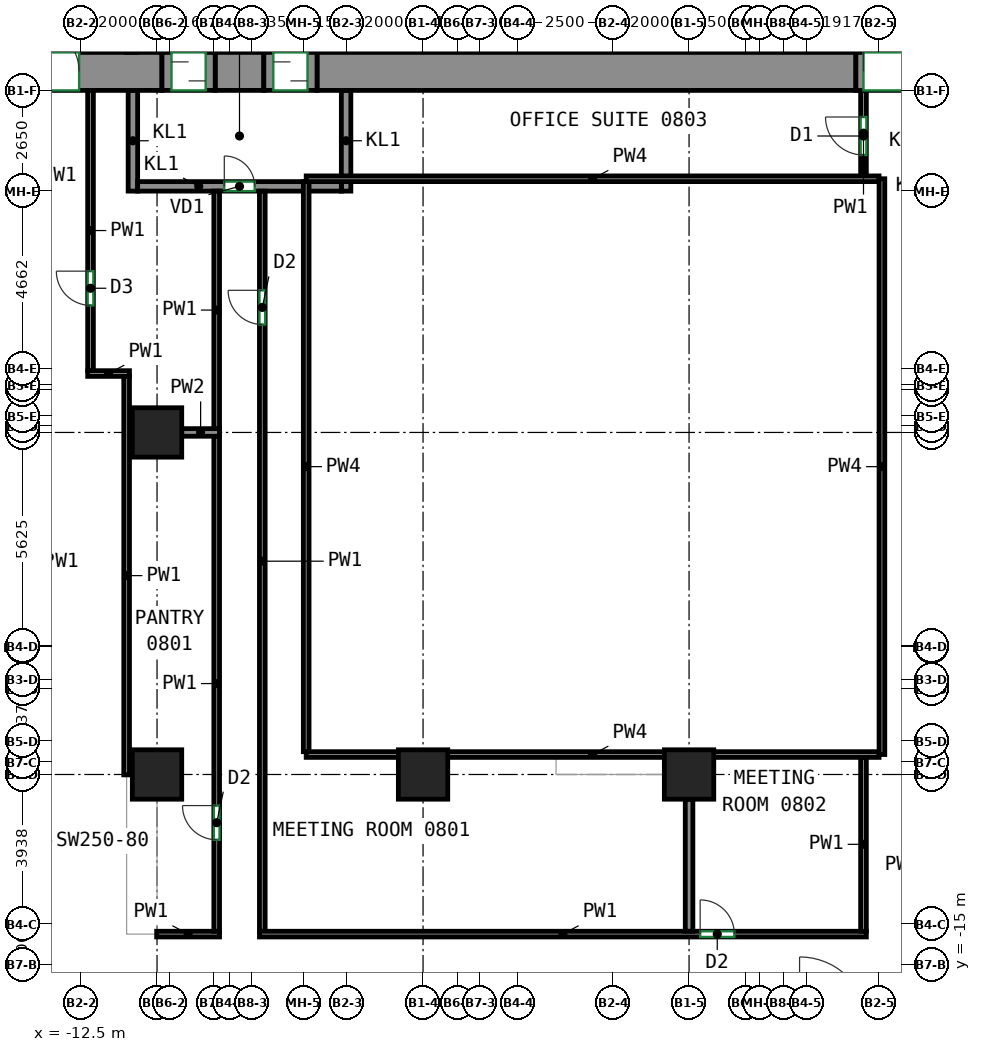
"""IFC4 building model, lengths in metres.
Left out: names, types, materials, properties, quantities, classifications, styles, units other than length and angle.
Written with IfcOpenShell. Run it as: python <this file> out.ifc"""

import sys

from ifc_helpers import new_model, si_unit, direction, frame, frame_2d, origin, origin_2d, place, context, subcontext, project, spatial, rectangle, extrude, source, transform, mapped, element, fill, save


model = new_model("IFC4")
c1 = context("Model", 3, precision=1e-05, world=origin(), true_north=direction((0.0, 1.0)))
c2 = subcontext(c1, "Body", "Model", "MODEL_VIEW")
j1 = project(units=[si_unit("LENGTHUNIT", "METRE"), si_unit("PLANEANGLEUNIT", "RADIAN")], contexts=[c1])
p1 = place(None, origin())
s1 = spatial("IfcSite", under=j1, at=p1, CompositionType="ELEMENT")
p2 = place(p1, origin())
s2 = spatial("IfcBuilding", under=s1, at=p2, CompositionType="ELEMENT")
p3 = place(p2, frame((0.0, 0.0, 39.0)))
s3 = spatial("IfcBuildingStorey", under=s2, at=p3, CompositionType="ELEMENT", Elevation=39.0)
m1 = source(origin(), c2, "Body", "SweptSolid", [
    extrude(rectangle(XDim=1.3, YDim=1.3, at=origin_2d()), origin(), (0.0, 0.0, 1.0), 3.72),
])
for number, where, z_axis, x_axis in (
    (1, (-10.5, -10.0, 0.0), (0.0, 0.0, 1.0), (1.0, 0.0, 0.0)),
    (2, (-10.5, -1.0, 0.0), (0.0, 0.0, 1.0), (1.0, 0.0, 0.0)),
    (3, (-3.5, -10.0, 0.0), (0.0, 0.0, 1.0), (1.0, 0.0, 0.0)),
    (4, (3.5, -10.0, 0.0), (0.0, 0.0, 1.0), (1.0, 0.0, 0.0)),
):
    element("IfcColumn", number, at=place(p3, frame(where, z_axis=z_axis, x_axis=x_axis)), inside=s3, PredefinedType="COLUMN", context=c2, shape_type="MappedRepresentation", body=[
        mapped(m1, transform((0.0, 0.0, 0.0))),
    ])
m2 = source(origin(), c2, "Body", "SweptSolid", [
    extrude(rectangle(XDim=5.63, YDim=1.0, at=frame_2d((2.815, 0.0))), origin(), (0.0, 0.0, 1.0), 3.72),
])
p4 = place(p3, frame((-16.0, 8.5, 0.0), z_axis=(0.0, 0.0, 1.0), x_axis=(1.0, 0.0, 0.0)))
e5 = element("IfcWall", 5, at=p4, inside=s3, PredefinedType="SHEAR", context=c2, shape_type="MappedRepresentation", body=[
    mapped(m2, transform((0.0, 0.0, 0.0))),
])
p5 = place(p4, frame((2.25, 0.0, 0.0)))
e6 = element("IfcOpeningElement", 6, at=p5, cuts=e5, PredefinedType="OPENING", context=c2, shape_type="SweptSolid", body=[
    extrude(rectangle(XDim=1.2, YDim=2.1, at=frame_2d((0.6, 1.05))), frame((0.0, 0.51, 0.0), z_axis=(0.0, -1.0, 0.0), x_axis=(1.0, 0.0, 0.0)), (0.0, 0.0, 1.0), 1.02),
])
m3 = source(origin(), c2, "Body", "SweptSolid", [
    extrude(rectangle(XDim=1.28, YDim=1.0, at=frame_2d((0.64, 0.0))), origin(), (0.0, 0.0, 1.0), 3.72),
])
p6 = place(p3, frame((-8.97, 8.5, 0.0), z_axis=(0.0, 0.0, 1.0), x_axis=(1.0, 0.0, 0.0)))
e7 = element("IfcWall", 7, at=p6, inside=s3, PredefinedType="SHEAR", context=c2, shape_type="MappedRepresentation", body=[
    mapped(m3, transform((0.0, 0.0, 0.0))),
])
m4 = source(origin(), c2, "Body", "SweptSolid", [
    extrude(rectangle(XDim=14.18, YDim=1.0, at=frame_2d((7.09, 0.0))), origin(), (0.0, 0.0, 1.0), 3.72),
])
p7 = place(p3, frame((-6.29, 8.5, 0.0), z_axis=(0.0, 0.0, 1.0), x_axis=(1.0, 0.0, 0.0)))
e8 = element("IfcWall", 8, at=p7, inside=s3, PredefinedType="SHEAR", context=c2, shape_type="MappedRepresentation", body=[
    mapped(m4, transform((0.0, 0.0, 0.0))),
])
m5 = source(origin(), c2, "Body", "SweptSolid", [
    extrude(rectangle(XDim=2.65, YDim=0.25, at=frame_2d((1.325, 0.0))), origin(), (0.0, 0.0, 1.0), 3.72),
])
for number, where, z_axis, x_axis in (
    (9, (-11.135, 5.35, 0.0), (0.0, 0.0, 1.0), (0.0, 1.0, 0.0)),
    (10, (-5.525, 5.35, 0.0), (0.0, 0.0, 1.0), (0.0, 1.0, 0.0)),
):
    element("IfcWall", number, at=place(p3, frame(where, z_axis=z_axis, x_axis=x_axis)), inside=s3, PredefinedType="PARTITIONING", context=c2, shape_type="MappedRepresentation", body=[
        mapped(m5, transform((0.0, 0.0, 0.0))),
    ])
m6 = source(origin(), c2, "Body", "SweptSolid", [
    extrude(rectangle(XDim=5.36, YDim=0.25, at=frame_2d((2.68, 0.0))), origin(), (0.0, 0.0, 1.0), 3.72),
])
p8 = place(p3, frame((-11.01, 5.475, 0.0), z_axis=(0.0, 0.0, 1.0), x_axis=(1.0, 0.0, 0.0)))
e11 = element("IfcWall", 11, at=p8, inside=s3, PredefinedType="PARTITIONING", context=c2, shape_type="MappedRepresentation", body=[
    mapped(m6, transform((0.0, 0.0, 0.0))),
])
p9 = place(p8, frame((2.28, 0.0, 0.0)))
e12 = element("IfcOpeningElement", 12, at=p9, cuts=e11, PredefinedType="OPENING", context=c2, shape_type="SweptSolid", body=[
    extrude(rectangle(XDim=0.8, YDim=2.0, at=frame_2d((0.4, 1.0))), frame((0.0, 0.135, 0.0), z_axis=(0.0, -1.0, 0.0), x_axis=(1.0, 0.0, 0.0)), (0.0, 0.0, 1.0), 0.27),
])
m7 = source(origin(), c2, "Body", "SweptSolid", [
    extrude(rectangle(XDim=1.4, YDim=1.0, at=frame_2d((0.7, 0.0))), origin(), (0.0, 0.0, 1.0), 2.7),
])
p10 = place(p3, frame((-10.37, 8.5, 0.0), z_axis=(0.0, 0.0, 1.0), x_axis=(1.0, 0.0, 0.0)))
e13 = element("IfcWall", 13, at=p10, inside=s3, PredefinedType="PARTITIONING", context=c2, shape_type="MappedRepresentation", body=[
    mapped(m7, transform((0.0, 0.0, 0.0))),
])
p11 = place(p10, frame((0.25, 0.0, 0.0)))
e14 = element("IfcOpeningElement", 14, at=p11, cuts=e13, PredefinedType="OPENING", context=c2, shape_type="SweptSolid", body=[
    extrude(rectangle(XDim=0.9, YDim=2.1, at=frame_2d((0.45, 1.05))), frame((0.0, 0.51, 0.0), z_axis=(0.0, -1.0, 0.0), x_axis=(1.0, 0.0, 0.0)), (0.0, 0.0, 1.0), 1.02),
])
m8 = source(origin(), c2, "Body", "SweptSolid", [
    extrude(rectangle(XDim=1.4, YDim=1.0, at=frame_2d((0.7, 0.0))), origin(), (0.0, 0.0, 1.0), 2.7),
])
p12 = place(p3, frame((-7.69, 8.5, 0.0), z_axis=(0.0, 0.0, 1.0), x_axis=(1.0, 0.0, 0.0)))
e15 = element("IfcWall", 15, at=p12, inside=s3, PredefinedType="PARTITIONING", context=c2, shape_type="MappedRepresentation", body=[
    mapped(m8, transform((0.0, 0.0, 0.0))),
])
p13 = place(p12, frame((0.25, 0.0, 0.0)))
e16 = element("IfcOpeningElement", 16, at=p13, cuts=e15, PredefinedType="OPENING", context=c2, shape_type="SweptSolid", body=[
    extrude(rectangle(XDim=0.9, YDim=2.1, at=frame_2d((0.45, 1.05))), frame((0.0, 0.51, 0.0), z_axis=(0.0, -1.0, 0.0), x_axis=(1.0, 0.0, 0.0)), (0.0, 0.0, 1.0), 1.02),
])
m9 = source(origin(), c2, "Body", "SweptSolid", [
    extrude(rectangle(XDim=2.4, YDim=1.0, at=frame_2d((1.2, 0.0))), origin(), (0.0, 0.0, 1.0), 2.7),
])
p14 = place(p3, frame((7.89, 8.5, 0.0), z_axis=(0.0, 0.0, 1.0), x_axis=(1.0, 0.0, 0.0)))
e17 = element("IfcWall", 17, at=p14, inside=s3, PredefinedType="PARTITIONING", context=c2, shape_type="MappedRepresentation", body=[
    mapped(m9, transform((0.0, 0.0, 0.0))),
])
p15 = place(p14, frame((0.2, 0.0, 0.0)))
e18 = element("IfcOpeningElement", 18, at=p15, cuts=e17, PredefinedType="OPENING", context=c2, shape_type="SweptSolid", body=[
    extrude(rectangle(XDim=2.0, YDim=2.1, at=frame_2d((1.0, 1.05))), frame((0.0, 0.51, 0.0), z_axis=(0.0, -1.0, 0.0), x_axis=(1.0, 0.0, 0.0)), (0.0, 0.0, 1.0), 1.02),
])
p16 = place(p3, frame((-12.25, 0.625, 0.0), z_axis=(0.0, 0.0, 1.0), x_axis=(0.0, 1.0, 0.0)))
e19 = element("IfcWall", 19, at=p16, inside=s3, PredefinedType="PARTITIONING", context=c2, shape_type="SweptSolid", body=[
    extrude(rectangle(XDim=7.375, YDim=0.15, at=frame_2d((3.688, 0.0))), origin(), (0.0, 0.0, 1.0), 3.72),
])
p17 = place(p16, frame((1.719, 0.0, 0.0)))
e20 = element("IfcOpeningElement", 20, at=p17, cuts=e19, PredefinedType="OPENING", context=c2, shape_type="SweptSolid", body=[
    extrude(rectangle(XDim=0.9, YDim=2.1, at=frame_2d((0.45, 1.05))), frame((0.0, 0.085, 0.0), z_axis=(0.0, -1.0, 0.0), x_axis=(1.0, 0.0, 0.0)), (0.0, 0.0, 1.0), 0.17),
])
p18 = place(p3, frame((-12.325, 0.55, 0.0), z_axis=(0.0, 0.0, 1.0), x_axis=(1.0, 0.0, 0.0)))
e21 = element("IfcWall", 21, at=p18, inside=s3, PredefinedType="PARTITIONING", context=c2, shape_type="SweptSolid", body=[
    extrude(rectangle(XDim=1.1, YDim=0.15, at=frame_2d((0.55, 0.0))), origin(), (0.0, 0.0, 1.0), 3.72),
])
p19 = place(p3, frame((-8.93, -0.91, 0.0), z_axis=(0.0, 0.0, 1.0), x_axis=(0.0, 1.0, 0.0)))
e22 = element("IfcWall", 22, at=p19, inside=s3, PredefinedType="PARTITIONING", context=c2, shape_type="SweptSolid", body=[
    extrude(rectangle(XDim=6.26, YDim=0.15, at=frame_2d((3.13, 0.0))), origin(), (0.0, 0.0, 1.0), 3.72),
])
p20 = place(p3, frame((-7.73, -14.125, 0.0), z_axis=(0.0, 0.0, 1.0), x_axis=(0.0, 1.0, 0.0)))
e23 = element("IfcWall", 23, at=p20, inside=s3, PredefinedType="PARTITIONING", context=c2, shape_type="SweptSolid", body=[
    extrude(rectangle(XDim=19.475, YDim=0.15, at=frame_2d((9.738, 0.0))), origin(), (0.0, 0.0, 1.0), 3.72),
])
p21 = place(p20, frame((15.965, 0.0, 0.0)))
e24 = element("IfcOpeningElement", 24, at=p21, cuts=e23, PredefinedType="OPENING", context=c2, shape_type="SweptSolid", body=[
    extrude(rectangle(XDim=0.9, YDim=2.1, at=frame_2d((0.45, 1.05))), frame((0.0, 0.085, 0.0), z_axis=(0.0, -1.0, 0.0), x_axis=(1.0, 0.0, 0.0)), (0.0, 0.0, 1.0), 0.17),
])
p22 = place(p3, frame((-7.805, -14.2, 0.0), z_axis=(0.0, 0.0, 1.0), x_axis=(1.0, 0.0, 0.0)))
e25 = element("IfcWall", 25, at=p22, inside=s3, PredefinedType="PARTITIONING", context=c2, shape_type="SweptSolid", body=[
    extrude(rectangle(XDim=15.97, YDim=0.15, at=frame_2d((7.985, 0.0))), origin(), (0.0, 0.0, 1.0), 3.72),
])
p23 = place(p22, frame((11.597, 0.0, 0.0)))
e26 = element("IfcOpeningElement", 26, at=p23, cuts=e25, PredefinedType="OPENING", context=c2, shape_type="SweptSolid", body=[
    extrude(rectangle(XDim=0.9, YDim=2.1, at=frame_2d((0.45, 1.05))), frame((0.0, 0.085, 0.0), z_axis=(0.0, -1.0, 0.0), x_axis=(1.0, 0.0, 0.0)), (0.0, 0.0, 1.0), 0.17),
])
p24 = place(p3, frame((-11.3, -10.01, 0.0), z_axis=(0.0, 0.0, 1.0), x_axis=(0.0, 1.0, 0.0)))
e27 = element("IfcWall", 27, at=p24, inside=s3, PredefinedType="PARTITIONING", context=c2, shape_type="SweptSolid", body=[
    extrude(rectangle(XDim=10.485, YDim=0.15, at=frame_2d((5.243, 0.0))), origin(), (0.0, 0.0, 1.0), 3.72),
])
p25 = place(p3, frame((-10.51, -14.2, 0.0), z_axis=(0.0, 0.0, 1.0), x_axis=(1.0, 0.0, 0.0)))
e28 = element("IfcWall", 28, at=p25, inside=s3, PredefinedType="PARTITIONING", context=c2, shape_type="SweptSolid", body=[
    extrude(rectangle(XDim=1.655, YDim=0.15, at=frame_2d((0.828, 0.0))), origin(), (0.0, 0.0, 1.0), 3.72),
])
p26 = place(p3, frame((-8.93, -14.125, 0.0), z_axis=(0.0, 0.0, 1.0), x_axis=(0.0, 1.0, 0.0)))
e29 = element("IfcWall", 29, at=p26, inside=s3, PredefinedType="PARTITIONING", context=c2, shape_type="SweptSolid", body=[
    extrude(rectangle(XDim=13.035, YDim=0.15, at=frame_2d((6.518, 0.0))), origin(), (0.0, 0.0, 1.0), 3.72),
])
p27 = place(p26, frame((2.407, 0.0, 0.0)))
e30 = element("IfcOpeningElement", 30, at=p27, cuts=e29, PredefinedType="OPENING", context=c2, shape_type="SweptSolid", body=[
    extrude(rectangle(XDim=0.9, YDim=2.1, at=frame_2d((0.45, 1.05))), frame((0.0, 0.085, 0.0), z_axis=(0.0, -1.0, 0.0), x_axis=(1.0, 0.0, 0.0)), (0.0, 0.0, 1.0), 0.17),
])
p28 = place(p3, frame((8.09, -14.125, 0.0), z_axis=(0.0, 0.0, 1.0), x_axis=(0.0, 1.0, 0.0)))
e31 = element("IfcWall", 31, at=p28, inside=s3, PredefinedType="PARTITIONING", context=c2, shape_type="SweptSolid", body=[
    extrude(rectangle(XDim=4.575, YDim=0.15, at=frame_2d((2.288, 0.0))), origin(), (0.0, 0.0, 1.0), 3.72),
])
p29 = place(p3, frame((8.09, 5.75, 0.0), z_axis=(0.0, 0.0, 1.0), x_axis=(0.0, 1.0, 0.0)))
e32 = element("IfcWall", 32, at=p29, inside=s3, PredefinedType="PARTITIONING", context=c2, shape_type="SweptSolid", body=[
    extrude(rectangle(XDim=2.25, YDim=0.15, at=frame_2d((1.125, 0.0))), origin(), (0.0, 0.0, 1.0), 3.72),
])
p30 = place(p29, frame((0.55, 0.0, 0.0)))
e33 = element("IfcOpeningElement", 33, at=p30, cuts=e32, PredefinedType="OPENING", context=c2, shape_type="SweptSolid", body=[
    extrude(rectangle(XDim=1.0, YDim=2.1, at=frame_2d((0.5, 1.05))), frame((0.0, 0.085, 0.0), z_axis=(0.0, -1.0, 0.0), x_axis=(1.0, 0.0, 0.0)), (0.0, 0.0, 1.0), 0.17),
])
p31 = place(p3, frame((-9.85, -1.0, 0.0), z_axis=(0.0, 0.0, 1.0), x_axis=(1.0, 0.0, 0.0)))
e34 = element("IfcWall", 34, at=p31, inside=s3, PredefinedType="PARTITIONING", context=c2, shape_type="SweptSolid", body=[
    extrude(rectangle(XDim=0.994, YDim=0.2, at=frame_2d((0.497, 0.0))), origin(), (0.0, 0.0, 1.0), 3.72),
])
p32 = place(p3, frame((3.5, -14.124, 0.0), z_axis=(0.0, 0.0, 1.0), x_axis=(0.0, 1.0, 0.0)))
e35 = element("IfcWall", 35, at=p32, inside=s3, PredefinedType="PARTITIONING", context=c2, shape_type="SweptSolid", body=[
    extrude(rectangle(XDim=3.474, YDim=0.2, at=frame_2d((1.737, 0.0))), origin(), (0.0, 0.0, 1.0), 3.07),
])
p33 = place(p3, frame((8.5, -9.475, 0.0), z_axis=(0.0, 0.0, 1.0), x_axis=(-1.0, 0.0, 0.0)))
e36 = element("IfcWall", 36, at=p33, inside=s3, PredefinedType="PARTITIONING", context=c2, shape_type="SweptSolid", body=[
    extrude(rectangle(XDim=15.075, YDim=0.15, at=frame_2d((7.538, 0.0))), origin(), (0.0, 0.0, 1.0), 3.72),
])
p34 = place(p3, frame((-6.575, -9.4, 0.0), z_axis=(0.0, 0.0, 1.0), x_axis=(0.0, 1.0, 0.0)))
e37 = element("IfcWall", 37, at=p34, inside=s3, PredefinedType="PARTITIONING", context=c2, shape_type="SweptSolid", body=[
    extrude(rectangle(XDim=15.0, YDim=0.15, at=frame_2d((7.5, 0.0))), origin(), (0.0, 0.0, 1.0), 3.72),
])
p35 = place(p3, frame((-6.575, 5.675, 0.0), z_axis=(0.0, 0.0, 1.0), x_axis=(1.0, 0.0, 0.0)))
e38 = element("IfcWall", 38, at=p35, inside=s3, PredefinedType="PARTITIONING", context=c2, shape_type="SweptSolid", body=[
    extrude(rectangle(XDim=15.075, YDim=0.15, at=frame_2d((7.538, 0.0))), origin(), (0.0, 0.0, 1.0), 3.72),
])
p36 = place(p3, frame((8.575, 5.675, 0.0), z_axis=(0.0, 0.0, 1.0), x_axis=(0.0, -1.0, 0.0)))
e39 = element("IfcWall", 39, at=p36, inside=s3, PredefinedType="PARTITIONING", context=c2, shape_type="SweptSolid", body=[
    extrude(rectangle(XDim=15.15, YDim=0.15, at=frame_2d((7.575, 0.0))), origin(), (0.0, 0.0, 1.0), 3.72),
])
p37 = place(p15, origin())
e40 = element("IfcDoor", 40, at=p37, inside=s3, OperationType="DOUBLE_DOOR_SINGLE_SWING", PredefinedType="DOOR", context=c2, shape_type="SweptSolid", body=[
    extrude(rectangle(XDim=2.0, YDim=2.1, at=frame_2d((1.0, 1.05))), frame((0.0, 0.405, 0.0), z_axis=(0.0, -1.0, 0.0), x_axis=(1.0, 0.0, 0.0)), (0.0, 0.0, 1.0), 0.05),
])
fill(e18, e40)
p38 = place(p9, origin())
e41 = element("IfcDoor", 41, at=p38, inside=s3, OperationType="SINGLE_SWING_LEFT", PredefinedType="DOOR", context=c2, shape_type="SweptSolid", body=[
    extrude(rectangle(XDim=0.8, YDim=2.0, at=frame_2d((0.4, 1.0))), frame((0.0, 0.025, 0.0), z_axis=(0.0, -1.0, 0.0), x_axis=(1.0, 0.0, 0.0)), (0.0, 0.0, 1.0), 0.05),
])
fill(e12, e41)
p39 = place(p11, origin())
e42 = element("IfcDoor", 42, at=p39, inside=s3, OperationType="SLIDING_TO_LEFT", PredefinedType="DOOR", context=c2, shape_type="SweptSolid", body=[
    extrude(rectangle(XDim=0.9, YDim=2.1, at=frame_2d((0.45, 1.05))), frame((0.0, 0.405, 0.0), z_axis=(0.0, -1.0, 0.0), x_axis=(1.0, 0.0, 0.0)), (0.0, 0.0, 1.0), 0.05),
])
fill(e14, e42)
p40 = place(p13, origin())
e43 = element("IfcDoor", 43, at=p40, inside=s3, OperationType="SLIDING_TO_RIGHT", PredefinedType="DOOR", context=c2, shape_type="SweptSolid", body=[
    extrude(rectangle(XDim=0.9, YDim=2.1, at=frame_2d((0.45, 1.05))), frame((0.0, 0.405, 0.0), z_axis=(0.0, -1.0, 0.0), x_axis=(1.0, 0.0, 0.0)), (0.0, 0.0, 1.0), 0.05),
])
fill(e16, e43)
p41 = place(p5, origin())
e44 = element("IfcDoor", 44, at=p41, inside=s3, OperationType="DOUBLE_DOOR_SINGLE_SWING", PredefinedType="DOOR", context=c2, shape_type="SweptSolid", body=[
    extrude(rectangle(XDim=1.2, YDim=2.1, at=frame_2d((0.6, 1.05))), frame((0.0, 0.405, 0.0), z_axis=(0.0, -1.0, 0.0), x_axis=(1.0, 0.0, 0.0)), (0.0, 0.0, 1.0), 0.05),
])
fill(e6, e44)
p42 = place(p23, origin())
e45 = element("IfcDoor", 45, at=p42, inside=s3, OperationType="SINGLE_SWING_LEFT", PredefinedType="DOOR", context=c2, shape_type="SweptSolid", body=[
    extrude(rectangle(XDim=0.9, YDim=2.1, at=frame_2d((0.45, 1.05))), frame((0.0, 0.025, 0.0), z_axis=(0.0, -1.0, 0.0), x_axis=(1.0, 0.0, 0.0)), (0.0, 0.0, 1.0), 0.05),
])
fill(e26, e45)
p43 = place(p27, origin())
e46 = element("IfcDoor", 46, at=p43, inside=s3, OperationType="SINGLE_SWING_RIGHT", PredefinedType="DOOR", context=c2, shape_type="SweptSolid", body=[
    extrude(rectangle(XDim=0.9, YDim=2.1, at=frame_2d((0.45, 1.05))), frame((0.0, 0.025, 0.0), z_axis=(0.0, -1.0, 0.0), x_axis=(1.0, 0.0, 0.0)), (0.0, 0.0, 1.0), 0.05),
])
fill(e30, e46)
p44 = place(p21, origin())
e47 = element("IfcDoor", 47, at=p44, inside=s3, OperationType="SINGLE_SWING_RIGHT", PredefinedType="DOOR", context=c2, shape_type="SweptSolid", body=[
    extrude(rectangle(XDim=0.9, YDim=2.1, at=frame_2d((0.45, 1.05))), frame((0.0, 0.025, 0.0), z_axis=(0.0, -1.0, 0.0), x_axis=(1.0, 0.0, 0.0)), (0.0, 0.0, 1.0), 0.05),
])
fill(e24, e47)
p45 = place(p17, origin())
e48 = element("IfcDoor", 48, at=p45, inside=s3, OperationType="SINGLE_SWING_RIGHT", PredefinedType="DOOR", context=c2, shape_type="SweptSolid", body=[
    extrude(rectangle(XDim=0.9, YDim=2.1, at=frame_2d((0.45, 1.05))), frame((0.0, 0.025, 0.0), z_axis=(0.0, -1.0, 0.0), x_axis=(1.0, 0.0, 0.0)), (0.0, 0.0, 1.0), 0.05),
])
fill(e20, e48)
p46 = place(p30, origin())
e49 = element("IfcDoor", 49, at=p46, inside=s3, OperationType="SINGLE_SWING_RIGHT", PredefinedType="DOOR", context=c2, shape_type="SweptSolid", body=[
    extrude(rectangle(XDim=1.0, YDim=2.1, at=frame_2d((0.5, 1.05))), frame((0.0, 0.025, 0.0), z_axis=(0.0, -1.0, 0.0), x_axis=(1.0, 0.0, 0.0)), (0.0, 0.0, 1.0), 0.05),
])
fill(e33, e49)
save(model, sys.argv[1])
